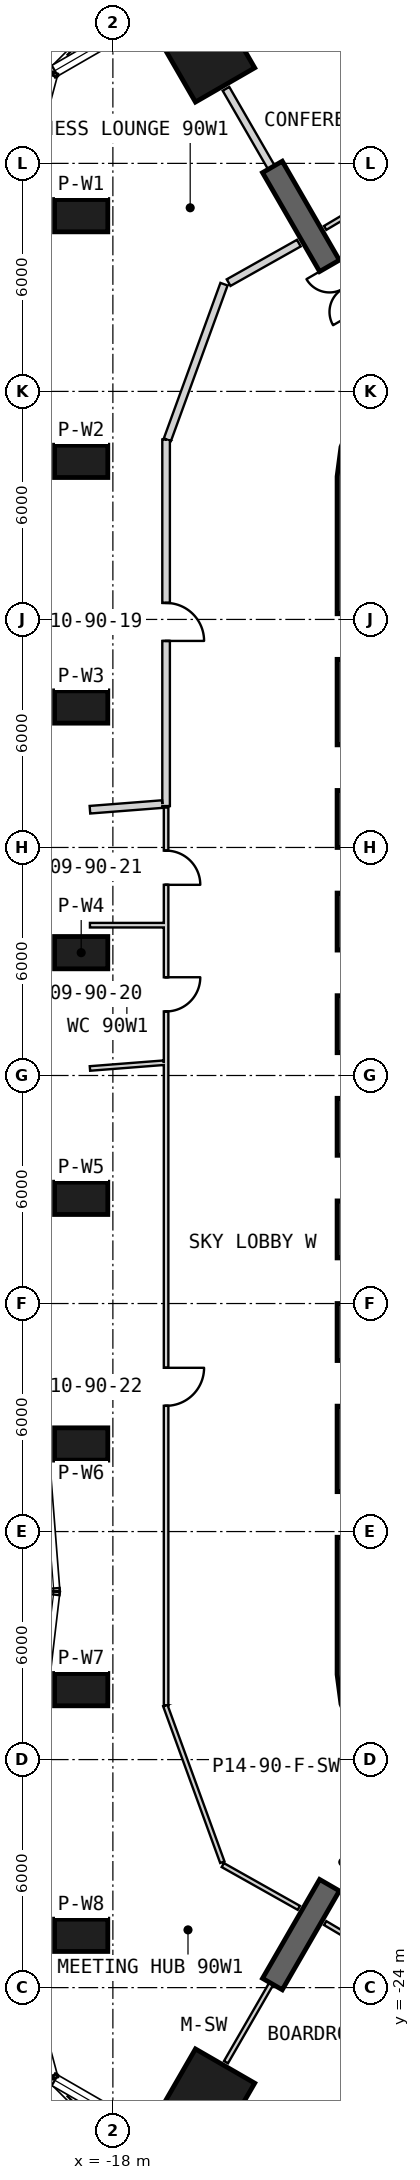
"""IFC4 building model, lengths in metres.
Left out: names, types, materials, properties, quantities, classifications, styles, units other than length and angle.
Written with IfcOpenShell. Run it as: python <this file> out.ifc"""

import sys

from ifc_helpers import new_model, si_unit, direction, frame, frame_2d, origin, origin_2d, place, context, subcontext, project, spatial, polyline, rectangle, outline, extrude, element, fill, save


model = new_model("IFC4")
c1 = context("Model", 3, precision=1e-05, world=origin(), true_north=direction((0.0, 1.0)))
c2 = subcontext(c1, "Body", "Model", "MODEL_VIEW")
j1 = project(units=[si_unit("LENGTHUNIT", "METRE"), si_unit("PLANEANGLEUNIT", "RADIAN")], contexts=[c1])
p1 = place(None, origin())
s1 = spatial("IfcSite", under=j1, at=p1, CompositionType="ELEMENT")
p2 = place(p1, origin())
s2 = spatial("IfcBuilding", under=s1, at=p2, CompositionType="ELEMENT")
p3 = place(p2, frame((0.0, 0.0, 392.3)))
s3 = spatial("IfcBuildingStorey", under=s2, at=p3, CompositionType="ELEMENT", Elevation=392.3)
for number, where, z_axis, x_axis in (
    (1, (-15.598, 27.016, 0.0), (0.0, 0.0, 1.0), (-0.5, 0.866, 0.0)),
    (2, (-15.598, -27.016, 0.0), (0.0, 0.0, 1.0), (-0.5, -0.866, 0.0)),
):
    element("IfcColumn", number, at=place(p3, frame(where, z_axis=z_axis, x_axis=x_axis)), inside=s3, PredefinedType="COLUMN", context=c2, shape_type="SweptSolid", body=[
        extrude(rectangle(XDim=2.2, YDim=1.8, at=origin_2d()), origin(), (0.0, 0.0, 1.0), 5.7),
    ])
for number, where, z_axis, x_axis in (
    (3, (-18.834, 22.624, 0.0), (0.0, 0.0, 1.0), (-1.0, 0.0, 0.0)),
    (4, (-18.834, 16.16, 0.0), (0.0, 0.0, 1.0), (-1.0, 0.0, 0.0)),
    (5, (-18.834, 9.696, 0.0), (0.0, 0.0, 1.0), (-1.0, 0.0, 0.0)),
    (6, (-18.834, 3.232, 0.0), (0.0, 0.0, 1.0), (-1.0, 0.0, 0.0)),
    (7, (-18.834, -3.232, 0.0), (0.0, 0.0, 1.0), (-1.0, 0.0, 0.0)),
    (8, (-18.834, -9.696, 0.0), (0.0, 0.0, 1.0), (-1.0, 0.0, 0.0)),
    (9, (-18.834, -16.16, 0.0), (0.0, 0.0, 1.0), (-1.0, 0.0, 0.0)),
    (10, (-18.834, -22.624, 0.0), (0.0, 0.0, 1.0), (-1.0, 0.0, 0.0)),
):
    element("IfcColumn", number, at=place(p3, frame(where, z_axis=z_axis, x_axis=x_axis)), inside=s3, PredefinedType="COLUMN", context=c2, shape_type="SweptSolid", body=[
        extrude(rectangle(XDim=1.4, YDim=0.85, at=origin_2d()), origin(), (0.0, 0.0, 1.0), 5.7),
    ])
p4 = place(p3, frame((-11.65, 15.762, 0.0), z_axis=(0.0, 0.0, 1.0), x_axis=(0.0, -1.0, 0.0)))
e11 = element("IfcWall", 11, at=p4, inside=s3, PredefinedType="SHEAR", context=c2, shape_type="SweptSolid", body=[
    extrude(rectangle(XDim=31.523, YDim=0.9, at=frame_2d((15.762, 0.0))), origin(), (0.0, 0.0, 1.0), 6.0),
])
p5 = place(p4, frame((7.062, 0.0, 0.0)))
e12 = element("IfcOpeningElement", 12, at=p5, cuts=e11, PredefinedType="OPENING", context=c2, shape_type="SweptSolid", body=[
    extrude(rectangle(XDim=1.2, YDim=2.4, at=frame_2d((0.6, 1.2))), frame((0.0, 0.46, 0.0), z_axis=(0.0, -1.0, 0.0), x_axis=(1.0, 0.0, 0.0)), (0.0, 0.0, 1.0), 0.92),
])
p6 = place(p4, frame((9.762, 0.0, 0.0)))
e13 = element("IfcOpeningElement", 13, at=p6, cuts=e11, PredefinedType="OPENING", context=c2, shape_type="SweptSolid", body=[
    extrude(rectangle(XDim=1.2, YDim=2.4, at=frame_2d((0.6, 1.2))), frame((0.0, 0.46, 0.0), z_axis=(0.0, -1.0, 0.0), x_axis=(1.0, 0.0, 0.0)), (0.0, 0.0, 1.0), 0.92),
])
p7 = place(p4, frame((12.462, 0.0, 0.0)))
e14 = element("IfcOpeningElement", 14, at=p7, cuts=e11, PredefinedType="OPENING", context=c2, shape_type="SweptSolid", body=[
    extrude(rectangle(XDim=1.2, YDim=2.4, at=frame_2d((0.6, 1.2))), frame((0.0, 0.46, 0.0), z_axis=(0.0, -1.0, 0.0), x_axis=(1.0, 0.0, 0.0)), (0.0, 0.0, 1.0), 0.92),
])
p8 = place(p4, frame((15.162, 0.0, 0.0)))
e15 = element("IfcOpeningElement", 15, at=p8, cuts=e11, PredefinedType="OPENING", context=c2, shape_type="SweptSolid", body=[
    extrude(rectangle(XDim=1.2, YDim=2.4, at=frame_2d((0.6, 1.2))), frame((0.0, 0.46, 0.0), z_axis=(0.0, -1.0, 0.0), x_axis=(1.0, 0.0, 0.0)), (0.0, 0.0, 1.0), 0.92),
])
p9 = place(p4, frame((17.862, 0.0, 0.0)))
e16 = element("IfcOpeningElement", 16, at=p9, cuts=e11, PredefinedType="OPENING", context=c2, shape_type="SweptSolid", body=[
    extrude(rectangle(XDim=1.2, YDim=2.4, at=frame_2d((0.6, 1.2))), frame((0.0, 0.46, 0.0), z_axis=(0.0, -1.0, 0.0), x_axis=(1.0, 0.0, 0.0)), (0.0, 0.0, 1.0), 0.92),
])
p10 = place(p4, frame((20.562, 0.0, 0.0)))
e17 = element("IfcOpeningElement", 17, at=p10, cuts=e11, PredefinedType="OPENING", context=c2, shape_type="SweptSolid", body=[
    extrude(rectangle(XDim=1.2, YDim=2.4, at=frame_2d((0.6, 1.2))), frame((0.0, 0.46, 0.0), z_axis=(0.0, -1.0, 0.0), x_axis=(1.0, 0.0, 0.0)), (0.0, 0.0, 1.0), 0.92),
])
p11 = place(p4, frame((23.262, 0.0, 0.0)))
e18 = element("IfcOpeningElement", 18, at=p11, cuts=e11, PredefinedType="OPENING", context=c2, shape_type="SweptSolid", body=[
    extrude(rectangle(XDim=1.2, YDim=2.4, at=frame_2d((0.6, 1.2))), frame((0.0, 0.46, 0.0), z_axis=(0.0, -1.0, 0.0), x_axis=(1.0, 0.0, 0.0)), (0.0, 0.0, 1.0), 0.92),
])
p12 = place(p4, frame((3.612, 0.0, 0.0)))
e19 = element("IfcOpeningElement", 19, at=p12, cuts=e11, PredefinedType="OPENING", context=c2, shape_type="SweptSolid", body=[
    extrude(rectangle(XDim=1.2, YDim=2.4, at=frame_2d((0.6, 1.2))), frame((0.0, 0.46, 0.0), z_axis=(0.0, -1.0, 0.0), x_axis=(1.0, 0.0, 0.0)), (0.0, 0.0, 1.0), 0.92),
])
p13 = place(p4, frame((26.712, 0.0, 0.0)))
e20 = element("IfcOpeningElement", 20, at=p13, cuts=e11, PredefinedType="OPENING", context=c2, shape_type="SweptSolid", body=[
    extrude(rectangle(XDim=1.2, YDim=2.4, at=frame_2d((0.6, 1.2))), frame((0.0, 0.46, 0.0), z_axis=(0.0, -1.0, 0.0), x_axis=(1.0, 0.0, 0.0)), (0.0, 0.0, 1.0), 0.92),
])
p14 = place(p3, origin())
e21 = element("IfcWall", 21, at=p14, inside=s3, PredefinedType="SHEAR", context=c2, shape_type="SweptSolid", body=[
    extrude(outline(polyline([(-7.6, 18.36), (-8.323, 18.659), (-9.1, 18.762), (-9.876, 18.659), (-10.6, 18.36), (-11.221, 17.883), (-11.698, 17.262), (-11.998, 16.538), (-12.1, 15.762), (-11.2, 15.762), (-11.128, 16.305), (-10.919, 16.812), (-10.585, 17.247), (-10.15, 17.58), (-9.644, 17.79), (-9.1, 17.862), (-8.556, 17.79), (-8.05, 17.58), (-7.6, 18.36)])), origin(), (0.0, 0.0, 1.0), 6.0),
])
p15 = place(p3, origin())
e22 = element("IfcWall", 22, at=p15, inside=s3, PredefinedType="SHEAR", context=c2, shape_type="SweptSolid", body=[
    extrude(outline(polyline([(-12.1, -15.762), (-11.998, -16.538), (-11.698, -17.262), (-11.221, -17.883), (-10.6, -18.36), (-9.876, -18.659), (-9.1, -18.762), (-8.323, -18.659), (-7.6, -18.36), (-8.05, -17.58), (-8.556, -17.79), (-9.1, -17.862), (-9.644, -17.79), (-10.15, -17.58), (-10.585, -17.247), (-10.919, -16.812), (-11.128, -16.305), (-11.2, -15.762), (-12.1, -15.762)])), origin(), (0.0, 0.0, 1.0), 6.0),
])
p16 = place(p3, frame((-10.575, 18.316, 0.0), z_axis=(0.0, 0.0, 1.0), x_axis=(-0.500011655475, 0.866018674388, 0.0)))
e23 = element("IfcWall", 23, at=p16, inside=s3, PredefinedType="SHEAR", context=c2, shape_type="SweptSolid", body=[
    extrude(rectangle(XDim=6.455, YDim=0.6, at=frame_2d((3.228, 0.0))), origin(), (0.0, 0.0, 1.0), 6.0),
])
p17 = place(p16, frame((2.05, 0.0, 0.0)))
e24 = element("IfcOpeningElement", 24, at=p17, cuts=e23, PredefinedType="OPENING", context=c2, shape_type="SweptSolid", body=[
    extrude(rectangle(XDim=1.4, YDim=2.4, at=frame_2d((0.7, 1.2))), frame((0.0, 0.31, 0.0), z_axis=(0.0, -1.0, 0.0), x_axis=(1.0, 0.0, 0.0)), (0.0, 0.0, 1.0), 0.62),
])
p18 = place(p3, frame((-10.575, -18.316, 0.0), z_axis=(0.0, 0.0, 1.0), x_axis=(-0.500011655475, -0.866018674388, 0.0)))
e25 = element("IfcWall", 25, at=p18, inside=s3, PredefinedType="SHEAR", context=c2, shape_type="SweptSolid", body=[
    extrude(rectangle(XDim=6.455, YDim=0.6, at=frame_2d((3.228, 0.0))), origin(), (0.0, 0.0, 1.0), 6.0),
])
p19 = place(p18, frame((2.05, 0.0, 0.0)))
e26 = element("IfcOpeningElement", 26, at=p19, cuts=e25, PredefinedType="OPENING", context=c2, shape_type="SweptSolid", body=[
    extrude(rectangle(XDim=1.4, YDim=2.4, at=frame_2d((0.7, 1.2))), frame((0.0, 0.31, 0.0), z_axis=(0.0, -1.0, 0.0), x_axis=(1.0, 0.0, 0.0)), (0.0, 0.0, 1.0), 0.62),
])
p20 = place(p3, frame((-16.6, 16.734, 0.0), z_axis=(0.0, 0.0, 1.0), x_axis=(0.0, -1.0, 0.0)))
e27 = element("IfcWall", 27, at=p20, inside=s3, PredefinedType="PARTITIONING", context=c2, shape_type="SweptSolid", body=[
    extrude(rectangle(XDim=9.645, YDim=0.2, at=frame_2d((4.823, 0.0))), origin(), (0.0, 0.0, 1.0), 5.07),
])
p21 = place(p20, frame((4.3, 0.0, 0.0)))
e28 = element("IfcOpeningElement", 28, at=p21, cuts=e27, PredefinedType="OPENING", context=c2, shape_type="SweptSolid", body=[
    extrude(rectangle(XDim=1.0, YDim=2.1, at=frame_2d((0.5, 1.05))), frame((0.0, 0.11, 0.0), z_axis=(0.0, -1.0, 0.0), x_axis=(1.0, 0.0, 0.0)), (0.0, 0.0, 1.0), 0.22),
])
p22 = place(p3, frame((-15.076, 20.822, 0.0), z_axis=(0.0, 0.0, 1.0), x_axis=(-0.342071567328, -0.939673902386, 0.0)))
e29 = element("IfcWall", 29, at=p22, inside=s3, PredefinedType="PARTITIONING", context=c2, shape_type="SweptSolid", body=[
    extrude(rectangle(XDim=4.356, YDim=0.2, at=frame_2d((2.178, 0.0))), origin(), (0.0, 0.0, 1.0), 5.07),
])
p23 = place(p3, frame((-13.107, 21.902, 0.0), z_axis=(0.0, 0.0, 1.0), x_axis=(-0.871581686769, -0.490250306772, 0.0)))
e30 = element("IfcWall", 30, at=p23, inside=s3, PredefinedType="PARTITIONING", context=c2, shape_type="SweptSolid", body=[
    extrude(rectangle(XDim=2.12, YDim=0.2, at=frame_2d((1.06, 0.0))), origin(), (0.0, 0.0, 1.0), 5.7),
])
p24 = place(p3, frame((-16.6, 7.049, 0.0), z_axis=(0.0, 0.0, 1.0), x_axis=(0.0, -1.0, 0.0)))
e31 = element("IfcWall", 31, at=p24, inside=s3, PredefinedType="PARTITIONING", context=c2, shape_type="SweptSolid", body=[
    extrude(rectangle(XDim=6.706, YDim=0.12, at=frame_2d((3.353, 0.0))), origin(), (0.0, 0.0, 1.0), 5.17),
])
p25 = place(p24, frame((4.464, 0.0, 0.0)))
e32 = element("IfcOpeningElement", 32, at=p25, cuts=e31, PredefinedType="OPENING", context=c2, shape_type="SweptSolid", body=[
    extrude(rectangle(XDim=0.9, YDim=2.1, at=frame_2d((0.45, 1.05))), frame((0.0, 0.07, 0.0), z_axis=(0.0, -1.0, 0.0), x_axis=(1.0, 0.0, 0.0)), (0.0, 0.0, 1.0), 0.14),
])
p26 = place(p24, frame((1.132, 0.0, 0.0)))
e33 = element("IfcOpeningElement", 33, at=p26, cuts=e31, PredefinedType="OPENING", context=c2, shape_type="SweptSolid", body=[
    extrude(rectangle(XDim=0.9, YDim=2.1, at=frame_2d((0.45, 1.05))), frame((0.0, 0.07, 0.0), z_axis=(0.0, -1.0, 0.0), x_axis=(1.0, 0.0, 0.0)), (0.0, 0.0, 1.0), 0.14),
])
p27 = place(p3, frame((-16.6, 0.344, 0.0), z_axis=(0.0, 0.0, 1.0), x_axis=(0.0, -1.0, 0.0)))
e34 = element("IfcWall", 34, at=p27, inside=s3, PredefinedType="PARTITIONING", context=c2, shape_type="SweptSolid", body=[
    extrude(rectangle(XDim=16.918, YDim=0.12, at=frame_2d((8.459, 0.0))), origin(), (0.0, 0.0, 1.0), 5.07),
])
p28 = place(p27, frame((8.035, 0.0, 0.0)))
e35 = element("IfcOpeningElement", 35, at=p28, cuts=e34, PredefinedType="OPENING", context=c2, shape_type="SweptSolid", body=[
    extrude(rectangle(XDim=1.0, YDim=2.1, at=frame_2d((0.5, 1.05))), frame((0.0, 0.07, 0.0), z_axis=(0.0, -1.0, 0.0), x_axis=(1.0, 0.0, 0.0)), (0.0, 0.0, 1.0), 0.14),
])
p29 = place(p3, frame((-15.108, -20.776, 0.0), z_axis=(0.0, 0.0, 1.0), x_axis=(0.87159257267, -0.490230952986, 0.0)))
e36 = element("IfcWall", 36, at=p29, inside=s3, PredefinedType="PARTITIONING", context=c2, shape_type="SweptSolid", body=[
    extrude(rectangle(XDim=2.296, YDim=0.12, at=frame_2d((1.148, 0.0))), origin(), (0.0, 0.0, 1.0), 5.7),
])
p30 = place(p3, frame((-16.621, -16.578, 0.0), z_axis=(0.0, 0.0, 1.0), x_axis=(0.342055849832, -0.939679623912, 0.0)))
e37 = element("IfcWall", 37, at=p30, inside=s3, PredefinedType="PARTITIONING", context=c2, shape_type="SweptSolid", body=[
    extrude(rectangle(XDim=4.387, YDim=0.12, at=frame_2d((2.193, 0.0))), origin(), (0.0, 0.0, 1.0), 5.07),
])
p31 = place(p3, frame((-18.604, 6.993, 0.0), z_axis=(0.0, 0.0, 1.0), x_axis=(0.99697500106, 0.077722887632, 0.0)))
e38 = element("IfcWall", 38, at=p31, inside=s3, PredefinedType="PARTITIONING", context=c2, shape_type="SweptSolid", body=[
    extrude(rectangle(XDim=1.91, YDim=0.2, at=frame_2d((0.955, 0.0))), origin(), (0.0, 0.0, 1.0), 4.07),
])
p32 = place(p3, frame((-15.024, 25.962, 0.0), z_axis=(0.0, 0.0, 1.0), x_axis=(0.500037706602, -0.866003632773, 0.0)))
e39 = element("IfcWall", 39, at=p32, inside=s3, PredefinedType="PARTITIONING", context=c2, shape_type="SweptSolid", body=[
    extrude(rectangle(XDim=2.391, YDim=0.2, at=frame_2d((1.195, 0.0))), origin(), (0.0, 0.0, 1.0), 5.27),
])
p33 = place(p3, frame((-16.66, 3.955, 0.0), z_axis=(0.0, 0.0, 1.0), x_axis=(-1.0, 0.0, 0.0)))
e40 = element("IfcWall", 40, at=p33, inside=s3, PredefinedType="PARTITIONING", context=c2, shape_type="SweptSolid", body=[
    extrude(rectangle(XDim=1.944, YDim=0.12, at=frame_2d((0.972, 0.0))), origin(), (0.0, 0.0, 1.0), 4.07),
])
p34 = place(p3, frame((-16.66, 0.336, 0.0), z_axis=(0.0, 0.0, 1.0), x_axis=(-0.996963204586, -0.077874056669, 0.0)))
e41 = element("IfcWall", 41, at=p34, inside=s3, PredefinedType="PARTITIONING", context=c2, shape_type="SweptSolid", body=[
    extrude(rectangle(XDim=1.95, YDim=0.12, at=frame_2d((0.975, 0.0))), origin(), (0.0, 0.0, 1.0), 4.07),
])
p35 = place(p3, frame((-15.024, -25.962, 0.0), z_axis=(0.0, 0.0, 1.0), x_axis=(0.500037706602, 0.866003632773, 0.0)))
e42 = element("IfcWall", 42, at=p35, inside=s3, PredefinedType="PARTITIONING", context=c2, shape_type="SweptSolid", body=[
    extrude(rectangle(XDim=2.391, YDim=0.12, at=frame_2d((1.195, 0.0))), origin(), (0.0, 0.0, 1.0), 5.27),
])
p36 = place(p3, frame((-10.438, 23.472, 0.0), z_axis=(0.0, 0.0, 1.0), x_axis=(-0.860350247392, -0.509703297824, 0.0)))
e43 = element("IfcWall", 43, at=p36, inside=s3, PredefinedType="PARTITIONING", context=c2, shape_type="SweptSolid", body=[
    extrude(rectangle(XDim=2.296, YDim=0.12, at=frame_2d((1.148, 0.0))), origin(), (0.0, 0.0, 1.0), 5.7),
])
p37 = place(p3, frame((-12.414, -22.302, 0.0), z_axis=(0.0, 0.0, 1.0), x_axis=(0.860362411229, -0.509682765398, 0.0)))
e44 = element("IfcWall", 44, at=p37, inside=s3, PredefinedType="PARTITIONING", context=c2, shape_type="SweptSolid", body=[
    extrude(rectangle(XDim=2.182, YDim=0.12, at=frame_2d((1.091, 0.0))), origin(), (0.0, 0.0, 1.0), 5.7),
])
p38 = place(p21, origin())
e45 = element("IfcDoor", 45, at=p38, inside=s3, OperationType="SINGLE_SWING_RIGHT", PredefinedType="USERDEFINED", context=c2, shape_type="SweptSolid", body=[
    extrude(rectangle(XDim=1.0, YDim=2.1, at=frame_2d((0.5, 1.05))), frame((0.0, 0.025, 0.0), z_axis=(0.0, -1.0, 0.0), x_axis=(1.0, 0.0, 0.0)), (0.0, 0.0, 1.0), 0.05),
])
fill(e28, e45)
p39 = place(p25, origin())
e46 = element("IfcDoor", 46, at=p39, inside=s3, OperationType="SINGLE_SWING_LEFT", PredefinedType="NOTDEFINED", context=c2, shape_type="SweptSolid", body=[
    extrude(rectangle(XDim=0.9, YDim=2.1, at=frame_2d((0.45, 1.05))), frame((0.0, 0.025, 0.0), z_axis=(0.0, -1.0, 0.0), x_axis=(1.0, 0.0, 0.0)), (0.0, 0.0, 1.0), 0.05),
])
fill(e32, e46)
p40 = place(p26, origin())
e47 = element("IfcDoor", 47, at=p40, inside=s3, OperationType="SINGLE_SWING_RIGHT", PredefinedType="NOTDEFINED", context=c2, shape_type="SweptSolid", body=[
    extrude(rectangle(XDim=0.9, YDim=2.1, at=frame_2d((0.45, 1.05))), frame((0.0, 0.025, 0.0), z_axis=(0.0, -1.0, 0.0), x_axis=(1.0, 0.0, 0.0)), (0.0, 0.0, 1.0), 0.05),
])
fill(e33, e47)
p41 = place(p28, origin())
e48 = element("IfcDoor", 48, at=p41, inside=s3, OperationType="SINGLE_SWING_LEFT", PredefinedType="NOTDEFINED", context=c2, shape_type="SweptSolid", body=[
    extrude(rectangle(XDim=1.0, YDim=2.1, at=frame_2d((0.5, 1.05))), frame((0.0, 0.025, 0.0), z_axis=(0.0, -1.0, 0.0), x_axis=(1.0, 0.0, 0.0)), (0.0, 0.0, 1.0), 0.05),
])
fill(e35, e48)
p42 = place(p17, origin())
e49 = element("IfcDoor", 49, at=p42, inside=s3, OperationType="DOUBLE_DOOR_SINGLE_SWING", PredefinedType="NOTDEFINED", context=c2, shape_type="SweptSolid", body=[
    extrude(rectangle(XDim=1.4, YDim=2.4, at=frame_2d((0.7, 1.2))), frame((0.0, 0.025, 0.0), z_axis=(0.0, -1.0, 0.0), x_axis=(1.0, 0.0, 0.0)), (0.0, 0.0, 1.0), 0.05),
])
fill(e24, e49)
p43 = place(p19, origin())
e50 = element("IfcDoor", 50, at=p43, inside=s3, OperationType="DOUBLE_DOOR_SINGLE_SWING", PredefinedType="NOTDEFINED", context=c2, shape_type="SweptSolid", body=[
    extrude(rectangle(XDim=1.4, YDim=2.4, at=frame_2d((0.7, 1.2))), frame((0.0, 0.025, 0.0), z_axis=(0.0, -1.0, 0.0), x_axis=(1.0, 0.0, 0.0)), (0.0, 0.0, 1.0), 0.05),
])
fill(e26, e50)
save(model, sys.argv[1])
